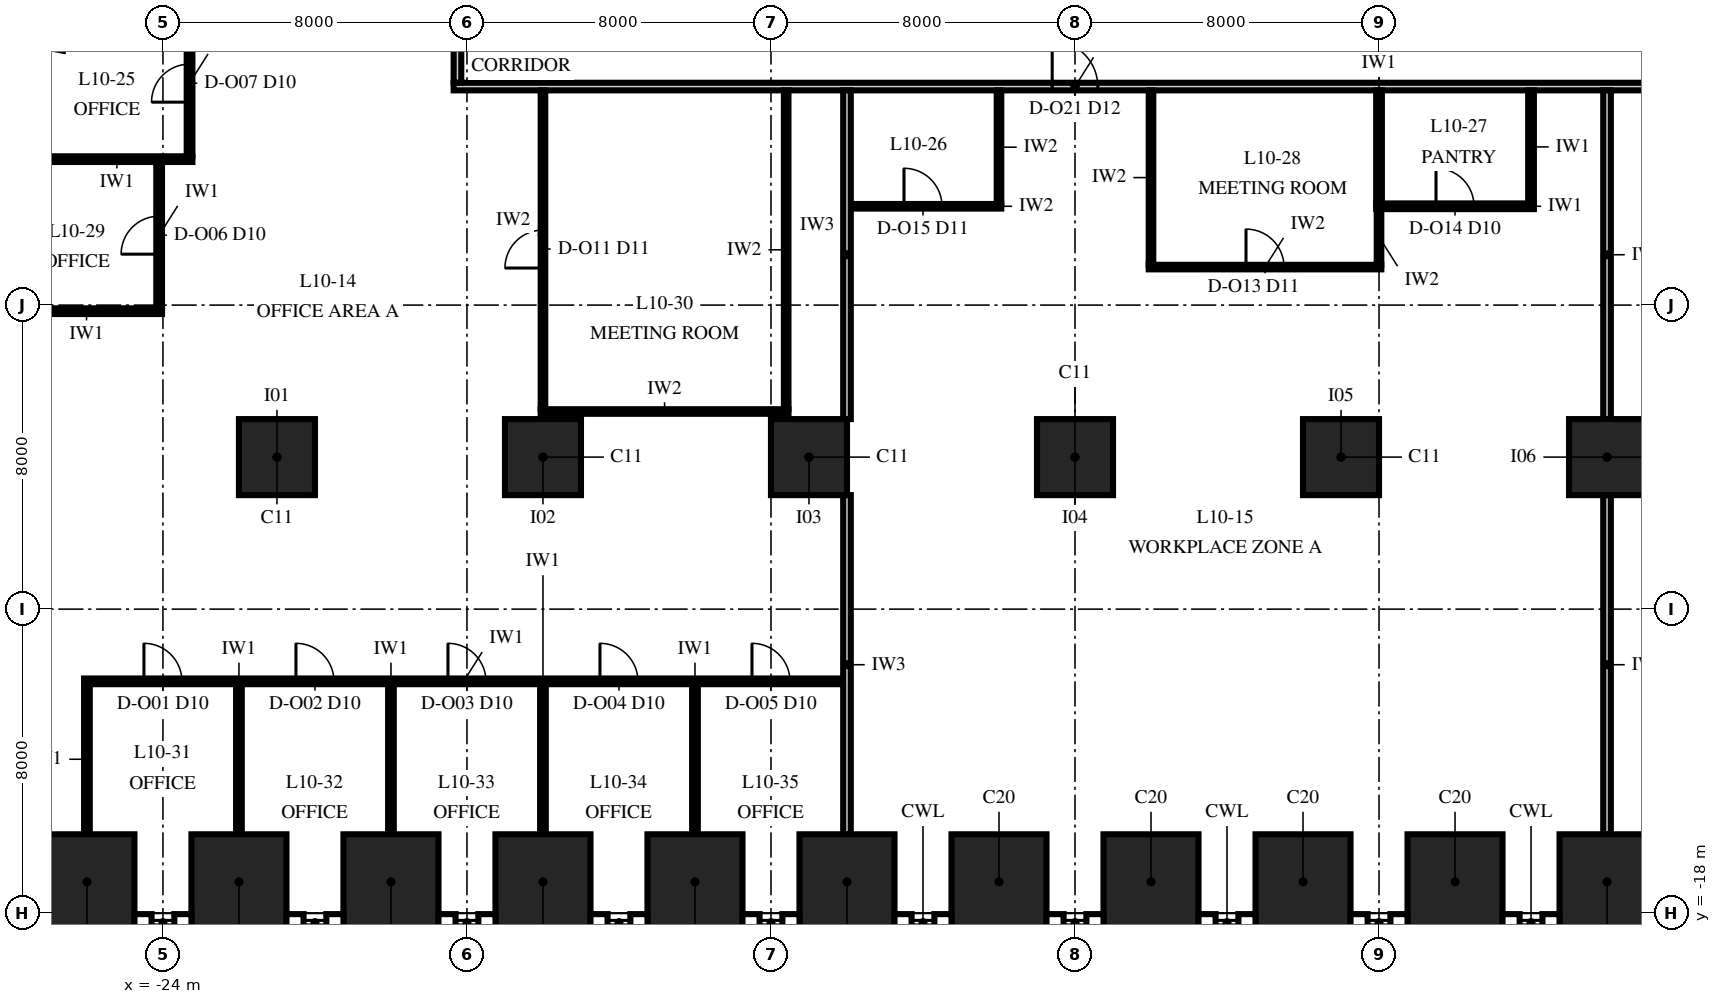
"""IFC4 building model, lengths in metres.
Left out: names, types, materials, properties, quantities, classifications, styles, units other than length and angle.
Written with IfcOpenShell. Run it as: python <this file> out.ifc"""

import sys

from ifc_helpers import new_model, si_unit, direction, frame, frame_2d, origin, origin_2d, place, context, subcontext, project, spatial, rectangle, extrude, element, fill, save


model = new_model("IFC4")
c1 = context("Model", 3, precision=1e-05, world=origin(), true_north=direction((0.0, 1.0)))
c2 = subcontext(c1, "Body", "Model", "MODEL_VIEW")
j1 = project(units=[si_unit("LENGTHUNIT", "METRE"), si_unit("PLANEANGLEUNIT", "RADIAN")], contexts=[c1])
p1 = place(None, origin())
s1 = spatial("IfcSite", under=j1, at=p1, CompositionType="ELEMENT")
p2 = place(p1, origin())
s2 = spatial("IfcBuilding", under=s1, at=p2, CompositionType="ELEMENT")
p3 = place(p2, frame((0.0, 0.0, 52.0)))
s3 = spatial("IfcBuildingStorey", under=s2, at=p3, CompositionType="ELEMENT", Elevation=52.0)
for number, where, z_axis, x_axis in (
    (1, (-26.0, -17.175, 0.0), (0.0, 0.0, 1.0), (1.0, 0.0, 0.0)),
    (2, (-22.0, -17.175, 0.0), (0.0, 0.0, 1.0), (1.0, 0.0, 0.0)),
    (3, (-18.0, -17.175, 0.0), (0.0, 0.0, 1.0), (1.0, 0.0, 0.0)),
    (4, (-14.0, -17.175, 0.0), (0.0, 0.0, 1.0), (1.0, 0.0, 0.0)),
    (5, (-10.0, -17.175, 0.0), (0.0, 0.0, 1.0), (1.0, 0.0, 0.0)),
    (6, (-6.0, -17.175, 0.0), (0.0, 0.0, 1.0), (1.0, 0.0, 0.0)),
    (7, (-2.0, -17.175, 0.0), (0.0, 0.0, 1.0), (1.0, 0.0, 0.0)),
    (8, (2.0, -17.175, 0.0), (0.0, 0.0, 1.0), (1.0, 0.0, 0.0)),
    (9, (6.0, -17.175, 0.0), (0.0, 0.0, 1.0), (1.0, 0.0, 0.0)),
    (10, (10.0, -17.175, 0.0), (0.0, 0.0, 1.0), (1.0, 0.0, 0.0)),
    (11, (14.0, -17.175, 0.0), (0.0, 0.0, 1.0), (1.0, 0.0, 0.0)),
):
    element("IfcColumn", number, at=place(p3, frame(where, z_axis=z_axis, x_axis=x_axis)), inside=s3, PredefinedType="COLUMN", context=c2, shape_type="SweptSolid", body=[
        extrude(rectangle(XDim=2.5, YDim=2.5, at=origin_2d()), origin(), (0.0, 0.0, 1.0), 4.0),
    ])
for number, where, z_axis, x_axis in (
    (12, (-21.0, -6.0, 0.0), (0.0, 0.0, 1.0), (1.0, 0.0, 0.0)),
    (13, (-14.0, -6.0, 0.0), (0.0, 0.0, 1.0), (1.0, 0.0, 0.0)),
    (14, (-7.0, -6.0, 0.0), (0.0, 0.0, 1.0), (1.0, 0.0, 0.0)),
    (15, (0.0, -6.0, 0.0), (0.0, 0.0, 1.0), (1.0, 0.0, 0.0)),
    (16, (7.0, -6.0, 0.0), (0.0, 0.0, 1.0), (1.0, 0.0, 0.0)),
    (17, (14.0, -6.0, 0.0), (0.0, 0.0, 1.0), (1.0, 0.0, 0.0)),
):
    element("IfcColumn", number, at=place(p3, frame(where, z_axis=z_axis, x_axis=x_axis)), inside=s3, PredefinedType="COLUMN", context=c2, shape_type="SweptSolid", body=[
        extrude(rectangle(XDim=2.0, YDim=2.0, at=origin_2d()), origin(), (0.0, 0.0, 1.0), 4.0),
    ])
p4 = place(p3, frame((-26.075, -11.9, 0.0), z_axis=(0.0, 0.0, 1.0), x_axis=(1.0, 0.0, 0.0)))
e18 = element("IfcWall", 18, at=p4, inside=s3, PredefinedType="PARTITIONING", context=c2, shape_type="SweptSolid", body=[
    extrude(rectangle(XDim=19.975, YDim=0.15, at=frame_2d((9.987, 0.0))), origin(), (0.0, 0.0, 1.0), 3.25),
])
p5 = place(p4, frame((1.575, 0.0, 0.0)))
e19 = element("IfcOpeningElement", 19, at=p5, cuts=e18, PredefinedType="OPENING", context=c2, shape_type="SweptSolid", body=[
    extrude(rectangle(XDim=1.0, YDim=2.3, at=frame_2d((0.5, 1.15))), frame((0.0, 0.09, 0.0), z_axis=(0.0, -1.0, 0.0), x_axis=(1.0, 0.0, 0.0)), (0.0, 0.0, 1.0), 0.18),
])
p6 = place(p4, frame((5.575, 0.0, 0.0)))
e20 = element("IfcOpeningElement", 20, at=p6, cuts=e18, PredefinedType="OPENING", context=c2, shape_type="SweptSolid", body=[
    extrude(rectangle(XDim=1.0, YDim=2.3, at=frame_2d((0.5, 1.15))), frame((0.0, 0.09, 0.0), z_axis=(0.0, -1.0, 0.0), x_axis=(1.0, 0.0, 0.0)), (0.0, 0.0, 1.0), 0.18),
])
p7 = place(p4, frame((9.575, 0.0, 0.0)))
e21 = element("IfcOpeningElement", 21, at=p7, cuts=e18, PredefinedType="OPENING", context=c2, shape_type="SweptSolid", body=[
    extrude(rectangle(XDim=1.0, YDim=2.3, at=frame_2d((0.5, 1.15))), frame((0.0, 0.09, 0.0), z_axis=(0.0, -1.0, 0.0), x_axis=(1.0, 0.0, 0.0)), (0.0, 0.0, 1.0), 0.18),
])
p8 = place(p4, frame((13.575, 0.0, 0.0)))
e22 = element("IfcOpeningElement", 22, at=p8, cuts=e18, PredefinedType="OPENING", context=c2, shape_type="SweptSolid", body=[
    extrude(rectangle(XDim=1.0, YDim=2.3, at=frame_2d((0.5, 1.15))), frame((0.0, 0.09, 0.0), z_axis=(0.0, -1.0, 0.0), x_axis=(1.0, 0.0, 0.0)), (0.0, 0.0, 1.0), 0.18),
])
p9 = place(p4, frame((17.575, 0.0, 0.0)))
e23 = element("IfcOpeningElement", 23, at=p9, cuts=e18, PredefinedType="OPENING", context=c2, shape_type="SweptSolid", body=[
    extrude(rectangle(XDim=1.0, YDim=2.3, at=frame_2d((0.5, 1.15))), frame((0.0, 0.09, 0.0), z_axis=(0.0, -1.0, 0.0), x_axis=(1.0, 0.0, 0.0)), (0.0, 0.0, 1.0), 0.18),
])
p10 = place(p3, frame((-14.06, -4.8, 0.0), z_axis=(0.0, 0.0, 1.0), x_axis=(1.0, 0.0, 0.0)))
e24 = element("IfcWall", 24, at=p10, inside=s3, PredefinedType="PARTITIONING", context=c2, shape_type="SweptSolid", body=[
    extrude(rectangle(XDim=6.52, YDim=0.12, at=frame_2d((3.26, 0.0))), origin(), (0.0, 0.0, 1.0), 3.25),
])
p11 = place(p3, frame((-27.996, -2.16, 0.0), z_axis=(0.0, 0.0, 1.0), x_axis=(1.0, 0.0, 0.0)))
e25 = element("IfcWall", 25, at=p11, inside=s3, PredefinedType="PARTITIONING", context=c2, shape_type="SweptSolid", body=[
    extrude(rectangle(XDim=3.971, YDim=0.15, at=frame_2d((1.986, 0.0))), origin(), (0.0, 0.0, 1.0), 3.25),
])
p12 = place(p3, frame((1.94, -1.0, 0.0), z_axis=(0.0, 0.0, 1.0), x_axis=(1.0, 0.0, 0.0)))
e26 = element("IfcWall", 26, at=p12, inside=s3, PredefinedType="PARTITIONING", context=c2, shape_type="SweptSolid", body=[
    extrude(rectangle(XDim=6.12, YDim=0.12, at=frame_2d((3.06, 0.0))), origin(), (0.0, 0.0, 1.0), 3.25),
])
p13 = place(p12, frame((2.56, 0.0, 0.0)))
e27 = element("IfcOpeningElement", 27, at=p13, cuts=e26, PredefinedType="OPENING", context=c2, shape_type="SweptSolid", body=[
    extrude(rectangle(XDim=1.0, YDim=2.4, at=frame_2d((0.5, 1.2))), frame((0.0, 0.075, 0.0), z_axis=(0.0, -1.0, 0.0), x_axis=(1.0, 0.0, 0.0)), (0.0, 0.0, 1.0), 0.15),
])
p14 = place(p3, frame((-5.9, 0.6, 0.0), z_axis=(0.0, 0.0, 1.0), x_axis=(1.0, 0.0, 0.0)))
e28 = element("IfcWall", 28, at=p14, inside=s3, PredefinedType="PARTITIONING", context=c2, shape_type="SweptSolid", body=[
    extrude(rectangle(XDim=3.96, YDim=0.12, at=frame_2d((1.98, 0.0))), origin(), (0.0, 0.0, 1.0), 3.25),
])
p15 = place(p14, frame((1.4, 0.0, 0.0)))
e29 = element("IfcOpeningElement", 29, at=p15, cuts=e28, PredefinedType="OPENING", context=c2, shape_type="SweptSolid", body=[
    extrude(rectangle(XDim=1.0, YDim=2.4, at=frame_2d((0.5, 1.2))), frame((0.0, 0.075, 0.0), z_axis=(0.0, -1.0, 0.0), x_axis=(1.0, 0.0, 0.0)), (0.0, 0.0, 1.0), 0.15),
])
p16 = place(p3, frame((7.925, 0.6, 0.0), z_axis=(0.0, 0.0, 1.0), x_axis=(1.0, 0.0, 0.0)))
e30 = element("IfcWall", 30, at=p16, inside=s3, PredefinedType="PARTITIONING", context=c2, shape_type="SweptSolid", body=[
    extrude(rectangle(XDim=4.15, YDim=0.15, at=frame_2d((2.075, 0.0))), origin(), (0.0, 0.0, 1.0), 3.25),
])
p17 = place(p16, frame((1.575, 0.0, 0.0)))
e31 = element("IfcOpeningElement", 31, at=p17, cuts=e30, PredefinedType="OPENING", context=c2, shape_type="SweptSolid", body=[
    extrude(rectangle(XDim=1.0, YDim=2.3, at=frame_2d((0.5, 1.15))), frame((0.0, 0.09, 0.0), z_axis=(0.0, -1.0, 0.0), x_axis=(1.0, 0.0, 0.0)), (0.0, 0.0, 1.0), 0.18),
])
p18 = place(p3, frame((-27.196, 1.84, 0.0), z_axis=(0.0, 0.0, 1.0), x_axis=(1.0, 0.0, 0.0)))
e32 = element("IfcWall", 32, at=p18, inside=s3, PredefinedType="PARTITIONING", context=c2, shape_type="SweptSolid", body=[
    extrude(rectangle(XDim=3.971, YDim=0.15, at=frame_2d((1.986, 0.0))), origin(), (0.0, 0.0, 1.0), 3.25),
])
p19 = place(p3, frame((-16.35, 3.75, 0.0), z_axis=(0.0, 0.0, 1.0), x_axis=(1.0, 0.0, 0.0)))
e33 = element("IfcWall", 33, at=p19, inside=s3, PredefinedType="PARTITIONING", context=c2, shape_type="SweptSolid", body=[
    extrude(rectangle(XDim=32.7, YDim=0.2, at=frame_2d((16.35, 0.0))), origin(), (0.0, 0.0, 1.0), 3.25),
])
p20 = place(p19, frame((15.75, 0.0, 0.0)))
e34 = element("IfcOpeningElement", 34, at=p20, cuts=e33, PredefinedType="OPENING", context=c2, shape_type="SweptSolid", body=[
    extrude(rectangle(XDim=1.2, YDim=2.4, at=frame_2d((0.6, 1.2))), frame((0.0, 0.115, 0.0), z_axis=(0.0, -1.0, 0.0), x_axis=(1.0, 0.0, 0.0)), (0.0, 0.0, 1.0), 0.23),
])
p21 = place(p3, frame((-26.0, -15.925, 0.0), z_axis=(0.0, 0.0, 1.0), x_axis=(0.0, 1.0, 0.0)))
e35 = element("IfcWall", 35, at=p21, inside=s3, PredefinedType="PARTITIONING", context=c2, shape_type="SweptSolid", body=[
    extrude(rectangle(XDim=3.95, YDim=0.15, at=frame_2d((1.975, 0.0))), origin(), (0.0, 0.0, 1.0), 3.25),
])
p22 = place(p3, frame((-24.1, -2.085, 0.0), z_axis=(0.0, 0.0, 1.0), x_axis=(0.0, 1.0, 0.0)))
e36 = element("IfcWall", 36, at=p22, inside=s3, PredefinedType="PARTITIONING", context=c2, shape_type="SweptSolid", body=[
    extrude(rectangle(XDim=3.85, YDim=0.15, at=frame_2d((1.925, 0.0))), origin(), (0.0, 0.0, 1.0), 3.85),
])
p23 = place(p22, frame((1.425, 0.0, 0.0)))
e37 = element("IfcOpeningElement", 37, at=p23, cuts=e36, PredefinedType="OPENING", context=c2, shape_type="SweptSolid", body=[
    extrude(rectangle(XDim=1.0, YDim=2.3, at=frame_2d((0.5, 1.15))), frame((0.0, 0.09, 0.0), z_axis=(0.0, -1.0, 0.0), x_axis=(1.0, 0.0, 0.0)), (0.0, 0.0, 1.0), 0.18),
])
p24 = place(p3, frame((-23.3, 1.915, 0.0), z_axis=(0.0, 0.0, 1.0), x_axis=(0.0, 1.0, 0.0)))
e38 = element("IfcWall", 38, at=p24, inside=s3, PredefinedType="PARTITIONING", context=c2, shape_type="SweptSolid", body=[
    extrude(rectangle(XDim=3.85, YDim=0.15, at=frame_2d((1.925, 0.0))), origin(), (0.0, 0.0, 1.0), 3.85),
])
p25 = place(p24, frame((1.425, 0.0, 0.0)))
e39 = element("IfcOpeningElement", 39, at=p25, cuts=e38, PredefinedType="OPENING", context=c2, shape_type="SweptSolid", body=[
    extrude(rectangle(XDim=1.0, YDim=2.3, at=frame_2d((0.5, 1.15))), frame((0.0, 0.09, 0.0), z_axis=(0.0, -1.0, 0.0), x_axis=(1.0, 0.0, 0.0)), (0.0, 0.0, 1.0), 0.18),
])
for number, where, z_axis, x_axis in (
    (40, (-22.0, -15.925, 0.0), (0.0, 0.0, 1.0), (0.0, 1.0, 0.0)),
    (41, (-18.0, -15.925, 0.0), (0.0, 0.0, 1.0), (0.0, 1.0, 0.0)),
):
    element("IfcWall", number, at=place(p3, frame(where, z_axis=z_axis, x_axis=x_axis)), inside=s3, PredefinedType="PARTITIONING", context=c2, shape_type="SweptSolid", body=[
        extrude(rectangle(XDim=3.95, YDim=0.15, at=frame_2d((1.975, 0.0))), origin(), (0.0, 0.0, 1.0), 3.25),
    ])
p26 = place(p3, frame((-16.25, 3.85, 0.0), z_axis=(0.0, 0.0, 1.0), x_axis=(0.0, 1.0, 0.0)))
e42 = element("IfcWall", 42, at=p26, inside=s3, PredefinedType="PARTITIONING", context=c2, shape_type="SweptSolid", body=[
    extrude(rectangle(XDim=22.3, YDim=0.2, at=frame_2d((11.15, 0.0))), origin(), (0.0, 0.0, 1.0), 2.842),
])
p27 = place(p26, frame((4.55, 0.0, 0.0)))
e43 = element("IfcOpeningElement", 43, at=p27, cuts=e42, PredefinedType="OPENING", context=c2, shape_type="SweptSolid", body=[
    extrude(rectangle(XDim=1.2, YDim=2.4, at=frame_2d((0.6, 1.2))), frame((0.0, 0.115, 0.0), z_axis=(0.0, -1.0, 0.0), x_axis=(1.0, 0.0, 0.0)), (0.0, 0.0, 1.0), 0.23),
])
p28 = place(p3, frame((-14.0, -15.925, 0.0), z_axis=(0.0, 0.0, 1.0), x_axis=(0.0, 1.0, 0.0)))
e44 = element("IfcWall", 44, at=p28, inside=s3, PredefinedType="PARTITIONING", context=c2, shape_type="SweptSolid", body=[
    extrude(rectangle(XDim=3.95, YDim=0.15, at=frame_2d((1.975, 0.0))), origin(), (0.0, 0.0, 1.0), 3.25),
])
p29 = place(p3, frame((-14.0, -4.74, 0.0), z_axis=(0.0, 0.0, 1.0), x_axis=(0.0, 1.0, 0.0)))
e45 = element("IfcWall", 45, at=p29, inside=s3, PredefinedType="PARTITIONING", context=c2, shape_type="SweptSolid", body=[
    extrude(rectangle(XDim=8.39, YDim=0.12, at=frame_2d((4.195, 0.0))), origin(), (0.0, 0.0, 1.0), 3.25),
])
p30 = place(p29, frame((3.715, 0.0, 0.0)))
e46 = element("IfcOpeningElement", 46, at=p30, cuts=e45, PredefinedType="OPENING", context=c2, shape_type="SweptSolid", body=[
    extrude(rectangle(XDim=1.0, YDim=2.4, at=frame_2d((0.5, 1.2))), frame((0.0, 0.075, 0.0), z_axis=(0.0, -1.0, 0.0), x_axis=(1.0, 0.0, 0.0)), (0.0, 0.0, 1.0), 0.15),
])
p31 = place(p3, frame((-10.0, -15.925, 0.0), z_axis=(0.0, 0.0, 1.0), x_axis=(0.0, 1.0, 0.0)))
e47 = element("IfcWall", 47, at=p31, inside=s3, PredefinedType="PARTITIONING", context=c2, shape_type="SweptSolid", body=[
    extrude(rectangle(XDim=3.95, YDim=0.15, at=frame_2d((1.975, 0.0))), origin(), (0.0, 0.0, 1.0), 3.25),
])
p32 = place(p3, frame((-7.6, -4.74, 0.0), z_axis=(0.0, 0.0, 1.0), x_axis=(0.0, 1.0, 0.0)))
e48 = element("IfcWall", 48, at=p32, inside=s3, PredefinedType="PARTITIONING", context=c2, shape_type="SweptSolid", body=[
    extrude(rectangle(XDim=8.39, YDim=0.12, at=frame_2d((4.195, 0.0))), origin(), (0.0, 0.0, 1.0), 3.85),
])
p33 = place(p3, frame((-6.0, -15.925, 0.0), z_axis=(0.0, 0.0, 1.0), x_axis=(0.0, 1.0, 0.0)))
e49 = element("IfcWall", 49, at=p33, inside=s3, PredefinedType="PARTITIONING", context=c2, shape_type="SweptSolid", body=[
    extrude(rectangle(XDim=8.925, YDim=0.2, at=frame_2d((4.462, 0.0))), origin(), (0.0, 0.0, 1.0), 3.25),
])
p34 = place(p3, frame((-6.0, -5.0, 0.0), z_axis=(0.0, 0.0, 1.0), x_axis=(0.0, 1.0, 0.0)))
e50 = element("IfcWall", 50, at=p34, inside=s3, PredefinedType="PARTITIONING", context=c2, shape_type="SweptSolid", body=[
    extrude(rectangle(XDim=8.65, YDim=0.2, at=frame_2d((4.325, 0.0))), origin(), (0.0, 0.0, 1.0), 3.25),
])
p35 = place(p3, frame((-2.0, 0.66, 0.0), z_axis=(0.0, 0.0, 1.0), x_axis=(0.0, 1.0, 0.0)))
e51 = element("IfcWall", 51, at=p35, inside=s3, PredefinedType="PARTITIONING", context=c2, shape_type="SweptSolid", body=[
    extrude(rectangle(XDim=2.99, YDim=0.12, at=frame_2d((1.495, 0.0))), origin(), (0.0, 0.0, 1.0), 3.85),
])
p36 = place(p3, frame((2.0, -0.94, 0.0), z_axis=(0.0, 0.0, 1.0), x_axis=(0.0, 1.0, 0.0)))
e52 = element("IfcWall", 52, at=p36, inside=s3, PredefinedType="PARTITIONING", context=c2, shape_type="SweptSolid", body=[
    extrude(rectangle(XDim=4.59, YDim=0.12, at=frame_2d((2.295, 0.0))), origin(), (0.0, 0.0, 1.0), 3.85),
])
p37 = place(p3, frame((8.0, -0.94, 0.0), z_axis=(0.0, 0.0, 1.0), x_axis=(0.0, 1.0, 0.0)))
e53 = element("IfcWall", 53, at=p37, inside=s3, PredefinedType="PARTITIONING", context=c2, shape_type="SweptSolid", body=[
    extrude(rectangle(XDim=1.465, YDim=0.12, at=frame_2d((0.732, 0.0))), origin(), (0.0, 0.0, 1.0), 3.85),
])
for number, where, z_axis, x_axis in (
    (54, (8.0, 0.675, 0.0), (0.0, 0.0, 1.0), (0.0, 1.0, 0.0)),
    (55, (12.0, 0.675, 0.0), (0.0, 0.0, 1.0), (0.0, 1.0, 0.0)),
):
    element("IfcWall", number, at=place(p3, frame(where, z_axis=z_axis, x_axis=x_axis)), inside=s3, PredefinedType="PARTITIONING", context=c2, shape_type="SweptSolid", body=[
        extrude(rectangle(XDim=2.975, YDim=0.15, at=frame_2d((1.487, 0.0))), origin(), (0.0, 0.0, 1.0), 3.85),
    ])
p38 = place(p3, frame((14.0, -15.925, 0.0), z_axis=(0.0, 0.0, 1.0), x_axis=(0.0, 1.0, 0.0)))
e56 = element("IfcWall", 56, at=p38, inside=s3, PredefinedType="PARTITIONING", context=c2, shape_type="SweptSolid", body=[
    extrude(rectangle(XDim=8.925, YDim=0.2, at=frame_2d((4.462, 0.0))), origin(), (0.0, 0.0, 1.0), 3.25),
])
p39 = place(p3, frame((14.0, -5.0, 0.0), z_axis=(0.0, 0.0, 1.0), x_axis=(0.0, 1.0, 0.0)))
e57 = element("IfcWall", 57, at=p39, inside=s3, PredefinedType="PARTITIONING", context=c2, shape_type="SweptSolid", body=[
    extrude(rectangle(XDim=8.65, YDim=0.2, at=frame_2d((4.325, 0.0))), origin(), (0.0, 0.0, 1.0), 3.25),
])
p40 = place(p5, origin())
e58 = element("IfcDoor", 58, at=p40, inside=s3, OperationType="SINGLE_SWING_LEFT", PredefinedType="DOOR", context=c2, shape_type="SweptSolid", body=[
    extrude(rectangle(XDim=1.0, YDim=2.3, at=frame_2d((0.5, 1.15))), frame((0.0, 0.075, 0.0), z_axis=(0.0, -1.0, 0.0), x_axis=(1.0, 0.0, 0.0)), (0.0, 0.0, 1.0), 0.149),
])
fill(e19, e58)
p41 = place(p6, origin())
e59 = element("IfcDoor", 59, at=p41, inside=s3, OperationType="SINGLE_SWING_LEFT", PredefinedType="DOOR", context=c2, shape_type="SweptSolid", body=[
    extrude(rectangle(XDim=1.0, YDim=2.3, at=frame_2d((0.5, 1.15))), frame((0.0, 0.075, 0.0), z_axis=(0.0, -1.0, 0.0), x_axis=(1.0, 0.0, 0.0)), (0.0, 0.0, 1.0), 0.149),
])
fill(e20, e59)
p42 = place(p7, origin())
e60 = element("IfcDoor", 60, at=p42, inside=s3, OperationType="SINGLE_SWING_LEFT", PredefinedType="DOOR", context=c2, shape_type="SweptSolid", body=[
    extrude(rectangle(XDim=1.0, YDim=2.3, at=frame_2d((0.5, 1.15))), frame((0.0, 0.075, 0.0), z_axis=(0.0, -1.0, 0.0), x_axis=(1.0, 0.0, 0.0)), (0.0, 0.0, 1.0), 0.149),
])
fill(e21, e60)
p43 = place(p8, origin())
e61 = element("IfcDoor", 61, at=p43, inside=s3, OperationType="SINGLE_SWING_LEFT", PredefinedType="DOOR", context=c2, shape_type="SweptSolid", body=[
    extrude(rectangle(XDim=1.0, YDim=2.3, at=frame_2d((0.5, 1.15))), frame((0.0, 0.075, 0.0), z_axis=(0.0, -1.0, 0.0), x_axis=(1.0, 0.0, 0.0)), (0.0, 0.0, 1.0), 0.149),
])
fill(e22, e61)
p44 = place(p9, origin())
e62 = element("IfcDoor", 62, at=p44, inside=s3, OperationType="SINGLE_SWING_LEFT", PredefinedType="DOOR", context=c2, shape_type="SweptSolid", body=[
    extrude(rectangle(XDim=1.0, YDim=2.3, at=frame_2d((0.5, 1.15))), frame((0.0, 0.075, 0.0), z_axis=(0.0, -1.0, 0.0), x_axis=(1.0, 0.0, 0.0)), (0.0, 0.0, 1.0), 0.149),
])
fill(e23, e62)
p45 = place(p23, origin())
e63 = element("IfcDoor", 63, at=p45, inside=s3, OperationType="SINGLE_SWING_LEFT", PredefinedType="DOOR", context=c2, shape_type="SweptSolid", body=[
    extrude(rectangle(XDim=1.0, YDim=2.3, at=frame_2d((0.5, 1.15))), frame((0.0, 0.075, 0.0), z_axis=(0.0, -1.0, 0.0), x_axis=(1.0, 0.0, 0.0)), (0.0, 0.0, 1.0), 0.149),
])
fill(e37, e63)
p46 = place(p25, origin())
e64 = element("IfcDoor", 64, at=p46, inside=s3, OperationType="SINGLE_SWING_LEFT", PredefinedType="DOOR", context=c2, shape_type="SweptSolid", body=[
    extrude(rectangle(XDim=1.0, YDim=2.3, at=frame_2d((0.5, 1.15))), frame((0.0, 0.075, 0.0), z_axis=(0.0, -1.0, 0.0), x_axis=(1.0, 0.0, 0.0)), (0.0, 0.0, 1.0), 0.149),
])
fill(e39, e64)
p47 = place(p30, origin())
e65 = element("IfcDoor", 65, at=p47, inside=s3, OperationType="SINGLE_SWING_RIGHT", PredefinedType="DOOR", context=c2, shape_type="SweptSolid", body=[
    extrude(rectangle(XDim=1.0, YDim=2.4, at=frame_2d((0.5, 1.2))), frame((0.0, 0.06, 0.0), z_axis=(0.0, -1.0, 0.0), x_axis=(1.0, 0.0, 0.0)), (0.0, 0.0, 1.0), 0.12),
])
fill(e46, e65)
p48 = place(p13, origin())
e66 = element("IfcDoor", 66, at=p48, inside=s3, OperationType="SINGLE_SWING_RIGHT", PredefinedType="DOOR", context=c2, shape_type="SweptSolid", body=[
    extrude(rectangle(XDim=1.0, YDim=2.4, at=frame_2d((0.5, 1.2))), frame((0.0, 0.06, 0.0), z_axis=(0.0, -1.0, 0.0), x_axis=(1.0, 0.0, 0.0)), (0.0, 0.0, 1.0), 0.12),
])
fill(e27, e66)
p49 = place(p17, origin())
e67 = element("IfcDoor", 67, at=p49, inside=s3, OperationType="SINGLE_SWING_LEFT", PredefinedType="DOOR", context=c2, shape_type="SweptSolid", body=[
    extrude(rectangle(XDim=1.0, YDim=2.3, at=frame_2d((0.5, 1.15))), frame((0.0, 0.075, 0.0), z_axis=(0.0, -1.0, 0.0), x_axis=(1.0, 0.0, 0.0)), (0.0, 0.0, 1.0), 0.149),
])
fill(e31, e67)
p50 = place(p15, origin())
e68 = element("IfcDoor", 68, at=p50, inside=s3, OperationType="SINGLE_SWING_RIGHT", PredefinedType="DOOR", context=c2, shape_type="SweptSolid", body=[
    extrude(rectangle(XDim=1.0, YDim=2.4, at=frame_2d((0.5, 1.2))), frame((0.0, 0.06, 0.0), z_axis=(0.0, -1.0, 0.0), x_axis=(1.0, 0.0, 0.0)), (0.0, 0.0, 1.0), 0.12),
])
fill(e29, e68)
p51 = place(p20, origin())
e69 = element("IfcDoor", 69, at=p51, inside=s3, OperationType="SINGLE_SWING_LEFT", PredefinedType="DOOR", context=c2, shape_type="SweptSolid", body=[
    extrude(rectangle(XDim=1.2, YDim=2.4, at=frame_2d((0.6, 1.2))), frame((0.0, 0.1, 0.0), z_axis=(0.0, -1.0, 0.0), x_axis=(1.0, 0.0, 0.0)), (0.0, 0.0, 1.0), 0.199),
])
fill(e34, e69)
save(model, sys.argv[1])
